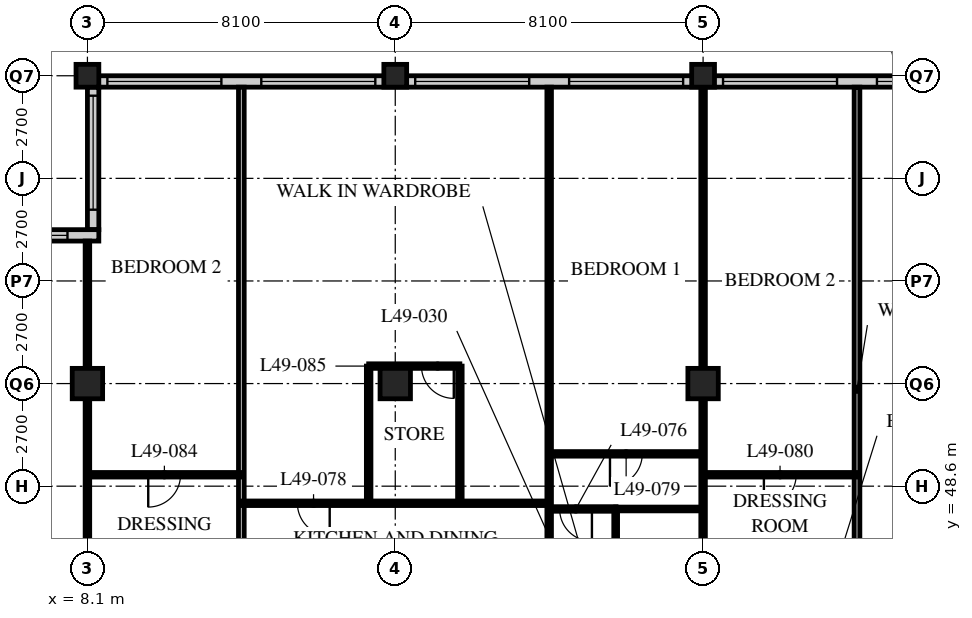
"""IFC4 building model, lengths in metres.
Left out: names, types, materials, properties, quantities, classifications, styles, units other than length and angle.
Written with IfcOpenShell. Run it as: python <this file> out.ifc"""

import sys

from ifc_helpers import new_model, si_unit, direction, frame, frame_2d, origin, origin_2d, place, context, subcontext, project, spatial, rectangle, hollow_rectangle, extrude, element, fill, save


model = new_model("IFC4")
c1 = context("Model", 3, precision=1e-05, world=origin(), true_north=direction((0.0, 1.0)))
c2 = subcontext(c1, "Body", "Model", "MODEL_VIEW")
j1 = project(units=[si_unit("LENGTHUNIT", "METRE"), si_unit("PLANEANGLEUNIT", "RADIAN")], contexts=[c1])
p1 = place(None, origin())
s1 = spatial("IfcSite", under=j1, at=p1, CompositionType="ELEMENT")
p2 = place(p1, origin())
s2 = spatial("IfcBuilding", under=s1, at=p2, CompositionType="ELEMENT")
p3 = place(p2, frame((0.0, 0.0, 192.0)))
s3 = spatial("IfcBuildingStorey", under=s2, at=p3, CompositionType="ELEMENT", Elevation=192.0)
p4 = place(p3, frame((8.1, 51.3, 0.0), z_axis=(0.0, 0.0, 1.0), x_axis=(1.0, 0.0, 0.0)))
e1 = element("IfcColumn", 1, at=p4, inside=s3, PredefinedType="COLUMN", context=c2, shape_type="SweptSolid", body=[
    extrude(hollow_rectangle(XDim=0.8, YDim=0.8, WallThickness=0.08, at=origin_2d()), origin(), (0.0, 0.0, 1.0), 3.6),
])
p5 = place(p3, frame((8.1, 59.4, 0.0), z_axis=(0.0, 0.0, 1.0), x_axis=(1.0, 0.0, 0.0)))
e2 = element("IfcColumn", 2, at=p5, inside=s3, PredefinedType="COLUMN", context=c2, shape_type="SweptSolid", body=[
    extrude(hollow_rectangle(XDim=0.6, YDim=0.6, WallThickness=0.05, at=origin_2d()), origin(), (0.0, 0.0, 1.0), 3.6),
])
p6 = place(p3, frame((16.2, 51.3, 0.0), z_axis=(0.0, 0.0, 1.0), x_axis=(1.0, 0.0, 0.0)))
e3 = element("IfcColumn", 3, at=p6, inside=s3, PredefinedType="COLUMN", context=c2, shape_type="SweptSolid", body=[
    extrude(hollow_rectangle(XDim=0.8, YDim=0.8, WallThickness=0.08, at=origin_2d()), origin(), (0.0, 0.0, 1.0), 3.6),
])
p7 = place(p3, frame((16.2, 59.4, 0.0), z_axis=(0.0, 0.0, 1.0), x_axis=(1.0, 0.0, 0.0)))
e4 = element("IfcColumn", 4, at=p7, inside=s3, PredefinedType="COLUMN", context=c2, shape_type="SweptSolid", body=[
    extrude(hollow_rectangle(XDim=0.6, YDim=0.6, WallThickness=0.05, at=origin_2d()), origin(), (0.0, 0.0, 1.0), 3.6),
])
p8 = place(p3, frame((24.3, 51.3, 0.0), z_axis=(0.0, 0.0, 1.0), x_axis=(1.0, 0.0, 0.0)))
e5 = element("IfcColumn", 5, at=p8, inside=s3, PredefinedType="COLUMN", context=c2, shape_type="SweptSolid", body=[
    extrude(hollow_rectangle(XDim=0.8, YDim=0.8, WallThickness=0.08, at=origin_2d()), origin(), (0.0, 0.0, 1.0), 3.6),
])
p9 = place(p3, frame((24.3, 59.4, 0.0), z_axis=(0.0, 0.0, 1.0), x_axis=(1.0, 0.0, 0.0)))
e6 = element("IfcColumn", 6, at=p9, inside=s3, PredefinedType="COLUMN", context=c2, shape_type="SweptSolid", body=[
    extrude(hollow_rectangle(XDim=0.6, YDim=0.6, WallThickness=0.05, at=origin_2d()), origin(), (0.0, 0.0, 1.0), 3.6),
])
p10 = place(p3, frame((48.3, 59.25, 0.0), z_axis=(0.0, 0.0, 1.0), x_axis=(-1.0, 0.0, 0.0)))
e7 = element("IfcWall", 7, at=p10, inside=s3, PredefinedType="SOLIDWALL", context=c2, shape_type="SweptSolid", body=[
    extrude(rectangle(XDim=40.2, YDim=0.3, at=frame_2d((20.1, 0.0))), origin(), (0.0, 0.0, 1.0), 3.39),
])
p11 = place(p10, frame((0.225, 0.0, 0.6)))
e8 = element("IfcOpeningElement", 8, at=p11, cuts=e7, PredefinedType="OPENING", context=c2, shape_type="SweptSolid", body=[
    extrude(rectangle(XDim=3.0, YDim=2.4, at=frame_2d((1.5, 1.2))), frame((0.0, 0.16, 0.0), z_axis=(0.0, -1.0, 0.0), x_axis=(1.0, 0.0, 0.0)), (0.0, 0.0, 1.0), 0.32),
])
p12 = place(p10, frame((4.275, 0.0, 0.6)))
e9 = element("IfcOpeningElement", 9, at=p12, cuts=e7, PredefinedType="OPENING", context=c2, shape_type="SweptSolid", body=[
    extrude(rectangle(XDim=3.0, YDim=2.4, at=frame_2d((1.5, 1.2))), frame((0.0, 0.16, 0.0), z_axis=(0.0, -1.0, 0.0), x_axis=(1.0, 0.0, 0.0)), (0.0, 0.0, 1.0), 0.32),
])
p13 = place(p10, frame((8.325, 0.0, 0.6)))
e10 = element("IfcOpeningElement", 10, at=p13, cuts=e7, PredefinedType="OPENING", context=c2, shape_type="SweptSolid", body=[
    extrude(rectangle(XDim=3.0, YDim=2.4, at=frame_2d((1.5, 1.2))), frame((0.0, 0.16, 0.0), z_axis=(0.0, -1.0, 0.0), x_axis=(1.0, 0.0, 0.0)), (0.0, 0.0, 1.0), 0.32),
])
p14 = place(p10, frame((12.375, 0.0, 0.6)))
e11 = element("IfcOpeningElement", 11, at=p14, cuts=e7, PredefinedType="OPENING", context=c2, shape_type="SweptSolid", body=[
    extrude(rectangle(XDim=3.0, YDim=2.4, at=frame_2d((1.5, 1.2))), frame((0.0, 0.16, 0.0), z_axis=(0.0, -1.0, 0.0), x_axis=(1.0, 0.0, 0.0)), (0.0, 0.0, 1.0), 0.32),
])
p15 = place(p10, frame((16.425, 0.0, 0.6)))
e12 = element("IfcOpeningElement", 12, at=p15, cuts=e7, PredefinedType="OPENING", context=c2, shape_type="SweptSolid", body=[
    extrude(rectangle(XDim=3.0, YDim=2.4, at=frame_2d((1.5, 1.2))), frame((0.0, 0.16, 0.0), z_axis=(0.0, -1.0, 0.0), x_axis=(1.0, 0.0, 0.0)), (0.0, 0.0, 1.0), 0.32),
])
p16 = place(p10, frame((20.475, 0.0, 0.6)))
e13 = element("IfcOpeningElement", 13, at=p16, cuts=e7, PredefinedType="OPENING", context=c2, shape_type="SweptSolid", body=[
    extrude(rectangle(XDim=3.0, YDim=2.4, at=frame_2d((1.5, 1.2))), frame((0.0, 0.16, 0.0), z_axis=(0.0, -1.0, 0.0), x_axis=(1.0, 0.0, 0.0)), (0.0, 0.0, 1.0), 0.32),
])
p17 = place(p10, frame((24.525, 0.0, 0.6)))
e14 = element("IfcOpeningElement", 14, at=p17, cuts=e7, PredefinedType="OPENING", context=c2, shape_type="SweptSolid", body=[
    extrude(rectangle(XDim=3.0, YDim=2.4, at=frame_2d((1.5, 1.2))), frame((0.0, 0.16, 0.0), z_axis=(0.0, -1.0, 0.0), x_axis=(1.0, 0.0, 0.0)), (0.0, 0.0, 1.0), 0.32),
])
p18 = place(p10, frame((28.575, 0.0, 0.6)))
e15 = element("IfcOpeningElement", 15, at=p18, cuts=e7, PredefinedType="OPENING", context=c2, shape_type="SweptSolid", body=[
    extrude(rectangle(XDim=3.0, YDim=2.4, at=frame_2d((1.5, 1.2))), frame((0.0, 0.16, 0.0), z_axis=(0.0, -1.0, 0.0), x_axis=(1.0, 0.0, 0.0)), (0.0, 0.0, 1.0), 0.32),
])
p19 = place(p10, frame((32.625, 0.0, 0.6)))
e16 = element("IfcOpeningElement", 16, at=p19, cuts=e7, PredefinedType="OPENING", context=c2, shape_type="SweptSolid", body=[
    extrude(rectangle(XDim=3.0, YDim=2.4, at=frame_2d((1.5, 1.2))), frame((0.0, 0.16, 0.0), z_axis=(0.0, -1.0, 0.0), x_axis=(1.0, 0.0, 0.0)), (0.0, 0.0, 1.0), 0.32),
])
p20 = place(p10, frame((36.675, 0.0, 0.6)))
e17 = element("IfcOpeningElement", 17, at=p20, cuts=e7, PredefinedType="OPENING", context=c2, shape_type="SweptSolid", body=[
    extrude(rectangle(XDim=3.0, YDim=2.4, at=frame_2d((1.5, 1.2))), frame((0.0, 0.16, 0.0), z_axis=(0.0, -1.0, 0.0), x_axis=(1.0, 0.0, 0.0)), (0.0, 0.0, 1.0), 0.32),
])
p21 = place(p3, frame((8.25, 59.1, 0.0), z_axis=(0.0, 0.0, 1.0), x_axis=(0.0, -1.0, 0.0)))
e18 = element("IfcWall", 18, at=p21, inside=s3, PredefinedType="SOLIDWALL", context=c2, shape_type="SweptSolid", body=[
    extrude(rectangle(XDim=3.75, YDim=0.3, at=frame_2d((1.875, 0.0))), origin(), (0.0, 0.0, 1.0), 3.39),
])
p22 = place(p21, frame((0.225, 0.0, 0.6)))
e19 = element("IfcOpeningElement", 19, at=p22, cuts=e18, PredefinedType="OPENING", context=c2, shape_type="SweptSolid", body=[
    extrude(rectangle(XDim=3.0, YDim=2.0, at=frame_2d((1.5, 1.0))), frame((0.0, 0.16, 0.0), z_axis=(0.0, -1.0, 0.0), x_axis=(1.0, 0.0, 0.0)), (0.0, 0.0, 1.0), 0.32),
])
p23 = place(p3, frame((8.4, 55.2, 0.0), z_axis=(0.0, 0.0, 1.0), x_axis=(-1.0, 0.0, 0.0)))
e20 = element("IfcWall", 20, at=p23, inside=s3, PredefinedType="SOLIDWALL", context=c2, shape_type="SweptSolid", body=[
    extrude(rectangle(XDim=4.35, YDim=0.3, at=frame_2d((2.175, 0.0))), origin(), (0.0, 0.0, 1.0), 3.39),
])
p24 = place(p23, frame((0.825, 0.0, 0.6)))
e21 = element("IfcOpeningElement", 21, at=p24, cuts=e20, PredefinedType="OPENING", context=c2, shape_type="SweptSolid", body=[
    extrude(rectangle(XDim=3.0, YDim=2.0, at=frame_2d((1.5, 1.0))), frame((0.0, 0.16, 0.0), z_axis=(0.0, -1.0, 0.0), x_axis=(1.0, 0.0, 0.0)), (0.0, 0.0, 1.0), 0.32),
])
p25 = place(p3, frame((22.0, 45.6, 0.0), z_axis=(0.0, 0.0, 1.0), x_axis=(0.0, 1.0, 0.0)))
e22 = element("IfcWall", 22, at=p25, inside=s3, PredefinedType="PARTITIONING", context=c2, shape_type="SweptSolid", body=[
    extrude(rectangle(XDim=2.4, YDim=0.1, at=frame_2d((1.2, 0.0))), origin(), (0.0, 0.0, 1.0), 3.39),
])
p26 = place(p25, frame((0.8, 0.0, 0.0)))
e23 = element("IfcOpeningElement", 23, at=p26, cuts=e22, PredefinedType="OPENING", context=c2, shape_type="SweptSolid", body=[
    extrude(rectangle(XDim=0.8, YDim=2.1, at=frame_2d((0.4, 1.05))), frame((0.0, 0.06, 0.0), z_axis=(0.0, -1.0, 0.0), x_axis=(1.0, 0.0, 0.0)), (0.0, 0.0, 1.0), 0.12),
])
p27 = place(p3, frame((22.0, 48.0, 0.0), z_axis=(0.0, 0.0, 1.0), x_axis=(1.0, 0.0, 0.0)))
e24 = element("IfcWall", 24, at=p27, inside=s3, PredefinedType="PARTITIONING", context=c2, shape_type="SweptSolid", body=[
    extrude(rectangle(XDim=2.3, YDim=0.1, at=frame_2d((1.15, 0.0))), origin(), (0.0, 0.0, 1.0), 3.39),
])
p28 = place(p3, frame((20.25, 45.6, 0.0), z_axis=(0.0, 0.0, 1.0), x_axis=(0.0, 1.0, 0.0)))
e25 = element("IfcWall", 25, at=p28, inside=s3, PredefinedType="PARTITIONING", context=c2, shape_type="SweptSolid", body=[
    extrude(rectangle(XDim=13.5, YDim=0.12, at=frame_2d((6.75, 0.0))), origin(), (0.0, 0.0, 1.0), 3.39),
])
p29 = place(p3, frame((24.3, 45.6, 0.0), z_axis=(0.0, 0.0, 1.0), x_axis=(0.0, 1.0, 0.0)))
e26 = element("IfcWall", 26, at=p29, inside=s3, PredefinedType="PARTITIONING", context=c2, shape_type="SweptSolid", body=[
    extrude(rectangle(XDim=13.5, YDim=0.12, at=frame_2d((6.75, 0.0))), origin(), (0.0, 0.0, 1.0), 2.778),
])
p30 = place(p3, frame((28.35, 43.2, 0.0), z_axis=(0.0, 0.0, 1.0), x_axis=(0.0, 1.0, 0.0)))
e27 = element("IfcWall", 27, at=p30, inside=s3, PredefinedType="PARTITIONING", context=c2, shape_type="SweptSolid", body=[
    extrude(rectangle(XDim=15.9, YDim=0.15, at=frame_2d((7.95, 0.0))), origin(), (0.0, 0.0, 1.0), 3.39),
])
p31 = place(p3, frame((8.1, 45.6, 0.0), z_axis=(0.0, 0.0, 1.0), x_axis=(0.0, 1.0, 0.0)))
e28 = element("IfcWall", 28, at=p31, inside=s3, PredefinedType="PARTITIONING", context=c2, shape_type="SweptSolid", body=[
    extrude(rectangle(XDim=9.45, YDim=0.12, at=frame_2d((4.725, 0.0))), origin(), (0.0, 0.0, 1.0), 2.778),
])
p32 = place(p3, frame((12.15, 43.2, 0.0), z_axis=(0.0, 0.0, 1.0), x_axis=(0.0, 1.0, 0.0)))
e29 = element("IfcWall", 29, at=p32, inside=s3, PredefinedType="PARTITIONING", context=c2, shape_type="SweptSolid", body=[
    extrude(rectangle(XDim=15.9, YDim=0.15, at=frame_2d((7.95, 0.0))), origin(), (0.0, 0.0, 1.0), 3.39),
])
p33 = place(p3, frame((20.25, 48.0, 0.0), z_axis=(0.0, 0.0, 1.0), x_axis=(1.0, 0.0, 0.0)))
e30 = element("IfcWall", 30, at=p33, inside=s3, PredefinedType="PARTITIONING", context=c2, shape_type="SweptSolid", body=[
    extrude(rectangle(XDim=1.76, YDim=0.12, at=frame_2d((0.88, 0.0))), origin(), (0.0, 0.0, 1.0), 3.39),
])
p34 = place(p33, frame((0.275, 0.0, 0.0)))
e31 = element("IfcOpeningElement", 31, at=p34, cuts=e30, PredefinedType="OPENING", context=c2, shape_type="SweptSolid", body=[
    extrude(rectangle(XDim=0.85, YDim=2.1, at=frame_2d((0.425, 1.05))), frame((0.0, 0.07, 0.0), z_axis=(0.0, -1.0, 0.0), x_axis=(1.0, 0.0, 0.0)), (0.0, 0.0, 1.0), 0.14),
])
p35 = place(p3, frame((12.15, 48.15, 0.0), z_axis=(0.0, 0.0, 1.0), x_axis=(1.0, 0.0, 0.0)))
e32 = element("IfcWall", 32, at=p35, inside=s3, PredefinedType="PARTITIONING", context=c2, shape_type="SweptSolid", body=[
    extrude(rectangle(XDim=8.1, YDim=0.12, at=frame_2d((4.05, 0.0))), origin(), (0.0, 0.0, 1.0), 3.39),
])
p36 = place(p35, frame((1.475, 0.0, 0.0)))
e33 = element("IfcOpeningElement", 33, at=p36, cuts=e32, PredefinedType="OPENING", context=c2, shape_type="SweptSolid", body=[
    extrude(rectangle(XDim=0.85, YDim=2.1, at=frame_2d((0.425, 1.05))), frame((0.0, 0.07, 0.0), z_axis=(0.0, -1.0, 0.0), x_axis=(1.0, 0.0, 0.0)), (0.0, 0.0, 1.0), 0.14),
])
p37 = place(p3, frame((20.25, 49.45, 0.0), z_axis=(0.0, 0.0, 1.0), x_axis=(1.0, 0.0, 0.0)))
e34 = element("IfcWall", 34, at=p37, inside=s3, PredefinedType="PARTITIONING", context=c2, shape_type="SweptSolid", body=[
    extrude(rectangle(XDim=4.05, YDim=0.12, at=frame_2d((2.025, 0.0))), origin(), (0.0, 0.0, 1.0), 3.39),
])
p38 = place(p37, frame((1.6, 0.0, 0.0)))
e35 = element("IfcOpeningElement", 35, at=p38, cuts=e34, PredefinedType="OPENING", context=c2, shape_type="SweptSolid", body=[
    extrude(rectangle(XDim=0.85, YDim=2.1, at=frame_2d((0.425, 1.05))), frame((0.0, 0.07, 0.0), z_axis=(0.0, -1.0, 0.0), x_axis=(1.0, 0.0, 0.0)), (0.0, 0.0, 1.0), 0.14),
])
p39 = place(p3, frame((24.3, 48.9, 0.0), z_axis=(0.0, 0.0, 1.0), x_axis=(1.0, 0.0, 0.0)))
e36 = element("IfcWall", 36, at=p39, inside=s3, PredefinedType="PARTITIONING", context=c2, shape_type="SweptSolid", body=[
    extrude(rectangle(XDim=4.05, YDim=0.12, at=frame_2d((2.025, 0.0))), origin(), (0.0, 0.0, 1.0), 3.39),
])
p40 = place(p39, frame((1.6, 0.0, 0.0)))
e37 = element("IfcOpeningElement", 37, at=p40, cuts=e36, PredefinedType="OPENING", context=c2, shape_type="SweptSolid", body=[
    extrude(rectangle(XDim=0.85, YDim=2.1, at=frame_2d((0.425, 1.05))), frame((0.0, 0.07, 0.0), z_axis=(0.0, -1.0, 0.0), x_axis=(1.0, 0.0, 0.0)), (0.0, 0.0, 1.0), 0.14),
])
p41 = place(p3, frame((8.1, 48.9, 0.0), z_axis=(0.0, 0.0, 1.0), x_axis=(1.0, 0.0, 0.0)))
e38 = element("IfcWall", 38, at=p41, inside=s3, PredefinedType="PARTITIONING", context=c2, shape_type="SweptSolid", body=[
    extrude(rectangle(XDim=4.05, YDim=0.12, at=frame_2d((2.025, 0.0))), origin(), (0.0, 0.0, 1.0), 3.39),
])
p42 = place(p41, frame((1.6, 0.0, 0.0)))
e39 = element("IfcOpeningElement", 39, at=p42, cuts=e38, PredefinedType="OPENING", context=c2, shape_type="SweptSolid", body=[
    extrude(rectangle(XDim=0.85, YDim=2.1, at=frame_2d((0.425, 1.05))), frame((0.0, 0.07, 0.0), z_axis=(0.0, -1.0, 0.0), x_axis=(1.0, 0.0, 0.0)), (0.0, 0.0, 1.0), 0.14),
])
for number, where, z_axis, x_axis in (
    (40, (15.5, 48.15, 0.0), (0.0, 0.0, 1.0), (0.0, 1.0, 0.0)),
    (41, (17.9, 48.15, 0.0), (0.0, 0.0, 1.0), (0.0, 1.0, 0.0)),
):
    element("IfcWall", number, at=place(p3, frame(where, z_axis=z_axis, x_axis=x_axis)), inside=s3, PredefinedType="PARTITIONING", context=c2, shape_type="SweptSolid", body=[
        extrude(rectangle(XDim=3.61, YDim=0.12, at=frame_2d((1.805, 0.0))), origin(), (0.0, 0.0, 1.0), 3.39),
    ])
p43 = place(p3, frame((15.5, 51.76, 0.0), z_axis=(0.0, 0.0, 1.0), x_axis=(1.0, 0.0, 0.0)))
e42 = element("IfcWall", 42, at=p43, inside=s3, PredefinedType="PARTITIONING", context=c2, shape_type="SweptSolid", body=[
    extrude(rectangle(XDim=2.4, YDim=0.12, at=frame_2d((1.2, 0.0))), origin(), (0.0, 0.0, 1.0), 3.39),
])
p44 = place(p43, frame((1.39, 0.0, 0.0)))
e43 = element("IfcOpeningElement", 43, at=p44, cuts=e42, PredefinedType="OPENING", context=c2, shape_type="SweptSolid", body=[
    extrude(rectangle(XDim=0.85, YDim=2.1, at=frame_2d((0.425, 1.05))), frame((0.0, 0.07, 0.0), z_axis=(0.0, -1.0, 0.0), x_axis=(1.0, 0.0, 0.0)), (0.0, 0.0, 1.0), 0.14),
])
p45 = place(p15, origin())
e44 = element("IfcWindow", 44, at=p45, inside=s3, PartitioningType="SINGLE_PANEL", PredefinedType="WINDOW", context=c2, shape_type="SweptSolid", body=[
    extrude(rectangle(XDim=3.0, YDim=2.4, at=frame_2d((1.5, 1.2))), frame((0.0, 0.03, 0.0), z_axis=(0.0, -1.0, 0.0), x_axis=(1.0, 0.0, 0.0)), (0.0, 0.0, 1.0), 0.06),
])
fill(e12, e44)
p46 = place(p16, origin())
e45 = element("IfcWindow", 45, at=p46, inside=s3, PartitioningType="SINGLE_PANEL", PredefinedType="WINDOW", context=c2, shape_type="SweptSolid", body=[
    extrude(rectangle(XDim=3.0, YDim=2.4, at=frame_2d((1.5, 1.2))), frame((0.0, 0.03, 0.0), z_axis=(0.0, -1.0, 0.0), x_axis=(1.0, 0.0, 0.0)), (0.0, 0.0, 1.0), 0.06),
])
fill(e13, e45)
p47 = place(p17, origin())
e46 = element("IfcWindow", 46, at=p47, inside=s3, PartitioningType="SINGLE_PANEL", PredefinedType="WINDOW", context=c2, shape_type="SweptSolid", body=[
    extrude(rectangle(XDim=3.0, YDim=2.4, at=frame_2d((1.5, 1.2))), frame((0.0, 0.03, 0.0), z_axis=(0.0, -1.0, 0.0), x_axis=(1.0, 0.0, 0.0)), (0.0, 0.0, 1.0), 0.06),
])
fill(e14, e46)
p48 = place(p18, origin())
e47 = element("IfcWindow", 47, at=p48, inside=s3, PartitioningType="SINGLE_PANEL", PredefinedType="WINDOW", context=c2, shape_type="SweptSolid", body=[
    extrude(rectangle(XDim=3.0, YDim=2.4, at=frame_2d((1.5, 1.2))), frame((0.0, 0.03, 0.0), z_axis=(0.0, -1.0, 0.0), x_axis=(1.0, 0.0, 0.0)), (0.0, 0.0, 1.0), 0.06),
])
fill(e15, e47)
p49 = place(p19, origin())
e48 = element("IfcWindow", 48, at=p49, inside=s3, PartitioningType="SINGLE_PANEL", PredefinedType="WINDOW", context=c2, shape_type="SweptSolid", body=[
    extrude(rectangle(XDim=3.0, YDim=2.4, at=frame_2d((1.5, 1.2))), frame((0.0, 0.03, 0.0), z_axis=(0.0, -1.0, 0.0), x_axis=(1.0, 0.0, 0.0)), (0.0, 0.0, 1.0), 0.06),
])
fill(e16, e48)
p50 = place(p20, origin())
e49 = element("IfcWindow", 49, at=p50, inside=s3, PartitioningType="SINGLE_PANEL", PredefinedType="WINDOW", context=c2, shape_type="SweptSolid", body=[
    extrude(rectangle(XDim=3.0, YDim=2.4, at=frame_2d((1.5, 1.2))), frame((0.0, 0.03, 0.0), z_axis=(0.0, -1.0, 0.0), x_axis=(1.0, 0.0, 0.0)), (0.0, 0.0, 1.0), 0.06),
])
fill(e17, e49)
p51 = place(p22, origin())
e50 = element("IfcWindow", 50, at=p51, inside=s3, PartitioningType="SINGLE_PANEL", PredefinedType="WINDOW", context=c2, shape_type="SweptSolid", body=[
    extrude(rectangle(XDim=3.0, YDim=2.0, at=frame_2d((1.5, 1.0))), frame((0.0, 0.03, 0.0), z_axis=(0.0, -1.0, 0.0), x_axis=(1.0, 0.0, 0.0)), (0.0, 0.0, 1.0), 0.06),
])
fill(e19, e50)
p52 = place(p24, origin())
e51 = element("IfcWindow", 51, at=p52, inside=s3, PartitioningType="SINGLE_PANEL", PredefinedType="WINDOW", context=c2, shape_type="SweptSolid", body=[
    extrude(rectangle(XDim=3.0, YDim=2.0, at=frame_2d((1.5, 1.0))), frame((0.0, 0.03, 0.0), z_axis=(0.0, -1.0, 0.0), x_axis=(1.0, 0.0, 0.0)), (0.0, 0.0, 1.0), 0.06),
])
fill(e21, e51)
p53 = place(p34, origin())
e52 = element("IfcDoor", 52, at=p53, inside=s3, OperationType="SINGLE_SWING_LEFT", PredefinedType="DOOR", context=c2, shape_type="SweptSolid", body=[
    extrude(rectangle(XDim=0.85, YDim=2.1, at=frame_2d((0.425, 1.05))), frame((0.0, 0.025, 0.0), z_axis=(0.0, -1.0, 0.0), x_axis=(1.0, 0.0, 0.0)), (0.0, 0.0, 1.0), 0.05),
])
fill(e31, e52)
p54 = place(p36, origin())
e53 = element("IfcDoor", 53, at=p54, inside=s3, OperationType="SINGLE_SWING_LEFT", PredefinedType="DOOR", context=c2, shape_type="SweptSolid", body=[
    extrude(rectangle(XDim=0.85, YDim=2.1, at=frame_2d((0.425, 1.05))), frame((0.0, 0.025, 0.0), z_axis=(0.0, -1.0, 0.0), x_axis=(1.0, 0.0, 0.0)), (0.0, 0.0, 1.0), 0.05),
])
fill(e33, e53)
p55 = place(p38, origin())
e54 = element("IfcDoor", 54, at=p55, inside=s3, OperationType="SINGLE_SWING_RIGHT", PredefinedType="DOOR", context=c2, shape_type="SweptSolid", body=[
    extrude(rectangle(XDim=0.85, YDim=2.1, at=frame_2d((0.425, 1.05))), frame((0.0, 0.025, 0.0), z_axis=(0.0, -1.0, 0.0), x_axis=(1.0, 0.0, 0.0)), (0.0, 0.0, 1.0), 0.05),
])
fill(e35, e54)
p56 = place(p40, origin())
e55 = element("IfcDoor", 55, at=p56, inside=s3, OperationType="SINGLE_SWING_RIGHT", PredefinedType="DOOR", context=c2, shape_type="SweptSolid", body=[
    extrude(rectangle(XDim=0.85, YDim=2.1, at=frame_2d((0.425, 1.05))), frame((0.0, 0.025, 0.0), z_axis=(0.0, -1.0, 0.0), x_axis=(1.0, 0.0, 0.0)), (0.0, 0.0, 1.0), 0.05),
])
fill(e37, e55)
p57 = place(p42, origin())
e56 = element("IfcDoor", 56, at=p57, inside=s3, OperationType="SINGLE_SWING_RIGHT", PredefinedType="DOOR", context=c2, shape_type="SweptSolid", body=[
    extrude(rectangle(XDim=0.85, YDim=2.1, at=frame_2d((0.425, 1.05))), frame((0.0, 0.025, 0.0), z_axis=(0.0, -1.0, 0.0), x_axis=(1.0, 0.0, 0.0)), (0.0, 0.0, 1.0), 0.05),
])
fill(e39, e56)
p58 = place(p44, origin())
e57 = element("IfcDoor", 57, at=p58, inside=s3, OperationType="SINGLE_SWING_LEFT", PredefinedType="DOOR", context=c2, shape_type="SweptSolid", body=[
    extrude(rectangle(XDim=0.85, YDim=2.1, at=frame_2d((0.425, 1.05))), frame((0.0, 0.025, 0.0), z_axis=(0.0, -1.0, 0.0), x_axis=(1.0, 0.0, 0.0)), (0.0, 0.0, 1.0), 0.05),
])
fill(e43, e57)
save(model, sys.argv[1])
